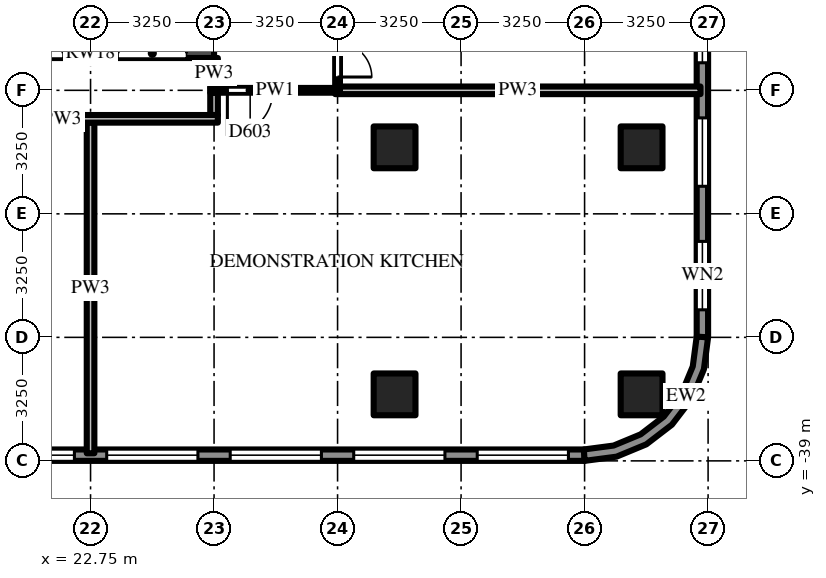
"""IFC4 building model, lengths in metres.
Left out: names, types, materials, properties, quantities, classifications, styles, units other than length and angle.
Written with IfcOpenShell. Run it as: python <this file> out.ifc"""

import sys

from ifc_helpers import new_model, si_unit, direction, frame, frame_2d, origin, origin_2d, place, context, subcontext, project, spatial, polyline, rectangle, outline, extrude, source, transform, mapped, element, fill, save


model = new_model("IFC4")
c1 = context("Model", 3, precision=1e-05, world=origin(), true_north=direction((0.0, 1.0)))
c2 = subcontext(c1, "Body", "Model", "MODEL_VIEW")
j1 = project(units=[si_unit("LENGTHUNIT", "METRE"), si_unit("PLANEANGLEUNIT", "RADIAN")], contexts=[c1])
p1 = place(None, origin())
s1 = spatial("IfcSite", under=j1, at=p1, CompositionType="ELEMENT")
p2 = place(p1, origin())
s2 = spatial("IfcBuilding", under=s1, at=p2, CompositionType="ELEMENT")
p3 = place(p2, frame((0.0, 0.0, 14.0)))
s3 = spatial("IfcBuildingStorey", under=s2, at=p3, CompositionType="ELEMENT", Elevation=14.0)
m1 = source(origin(), c2, "Body", "SweptSolid", [
    extrude(rectangle(XDim=1.1, YDim=1.1, at=origin_2d()), origin(), (0.0, 0.0, 1.0), 5.0),
])
for number, where, z_axis, x_axis in (
    (1, (30.75, -30.75, 0.0), (0.0, 0.0, 1.0), (1.0, 0.0, 0.0)),
    (2, (30.75, -37.25, 0.0), (0.0, 0.0, 1.0), (1.0, 0.0, 0.0)),
    (3, (37.25, -30.75, 0.0), (0.0, 0.0, 1.0), (1.0, 0.0, 0.0)),
    (4, (37.25, -37.25, 0.0), (0.0, 0.0, 1.0), (1.0, 0.0, 0.0)),
):
    element("IfcColumn", number, at=place(p3, frame(where, z_axis=z_axis, x_axis=x_axis)), inside=s3, PredefinedType="COLUMN", context=c2, shape_type="MappedRepresentation", body=[
        mapped(m1, transform((0.0, 0.0, 0.0))),
    ])
m2 = source(origin(), c2, "Body", "SweptSolid", [
    extrude(rectangle(XDim=6.5, YDim=0.25, at=frame_2d((3.25, 0.0))), origin(), (0.0, 0.0, 1.0), 4.7),
])
p4 = place(p3, frame((19.5, -28.275, 0.0), z_axis=(0.0, 0.0, 1.0), x_axis=(1.0, 0.0, 0.0)))
e5 = element("IfcWall", 5, at=p4, inside=s3, PredefinedType="SHEAR", context=c2, shape_type="MappedRepresentation", body=[
    mapped(m2, transform((0.0, 0.0, 0.0))),
])
m3 = source(origin(), c2, "Body", "SweptSolid", [
    extrude(rectangle(XDim=1.8, YDim=2.1, at=frame_2d((0.9, 1.05))), frame((0.0, 0.135, 0.0), z_axis=(0.0, -1.0, 0.0), x_axis=(1.0, 0.0, 0.0)), (0.0, 0.0, 1.0), 0.27),
])
p5 = place(p4, frame((0.725, 0.0, 0.0)))
e6 = element("IfcOpeningElement", 6, at=p5, cuts=e5, PredefinedType="OPENING", context=c2, shape_type="MappedRepresentation", body=[
    mapped(m3, transform((0.0, 0.0, 0.0))),
])
p6 = place(p4, frame((3.975, 0.0, 0.0)))
e7 = element("IfcOpeningElement", 7, at=p6, cuts=e5, PredefinedType="OPENING", context=c2, shape_type="MappedRepresentation", body=[
    mapped(m3, transform((0.0, 0.0, 0.0))),
])
m4 = source(origin(), c2, "Body", "SweptSolid", [
    extrude(rectangle(XDim=71.5, YDim=0.3, at=frame_2d((35.75, 0.0))), origin(), (0.0, 0.0, 1.0), 4.7),
])
p7 = place(p3, frame((38.85, -35.75, 0.0), z_axis=(0.0, 0.0, 1.0), x_axis=(0.0, 1.0, 0.0)))
e8 = element("IfcWall", 8, at=p7, inside=s3, PredefinedType="SOLIDWALL", context=c2, shape_type="MappedRepresentation", body=[
    mapped(m4, transform((0.0, 0.0, 0.0))),
])
m5 = source(origin(), c2, "Body", "SweptSolid", [
    extrude(rectangle(XDim=1.8, YDim=3.0, at=frame_2d((0.9, 1.5))), frame((0.0, 0.16, 0.0), z_axis=(0.0, -1.0, 0.0), x_axis=(1.0, 0.0, 0.0)), (0.0, 0.0, 1.0), 0.32),
])
p8 = place(p7, frame((0.725, 0.0, 0.9)))
e9 = element("IfcOpeningElement", 9, at=p8, cuts=e8, PredefinedType="OPENING", context=c2, shape_type="MappedRepresentation", body=[
    mapped(m5, transform((0.0, 0.0, 0.0))),
])
p9 = place(p7, frame((3.975, 0.0, 0.9)))
e10 = element("IfcOpeningElement", 10, at=p9, cuts=e8, PredefinedType="OPENING", context=c2, shape_type="MappedRepresentation", body=[
    mapped(m5, transform((0.0, 0.0, 0.0))),
])
p10 = place(p7, frame((7.225, 0.0, 0.9)))
e11 = element("IfcOpeningElement", 11, at=p10, cuts=e8, PredefinedType="OPENING", context=c2, shape_type="MappedRepresentation", body=[
    mapped(m5, transform((0.0, 0.0, 0.0))),
])
p11 = place(p7, frame((10.475, 0.0, 0.9)))
e12 = element("IfcOpeningElement", 12, at=p11, cuts=e8, PredefinedType="OPENING", context=c2, shape_type="MappedRepresentation", body=[
    mapped(m5, transform((0.0, 0.0, 0.0))),
])
p12 = place(p7, frame((13.725, 0.0, 0.9)))
e13 = element("IfcOpeningElement", 13, at=p12, cuts=e8, PredefinedType="OPENING", context=c2, shape_type="MappedRepresentation", body=[
    mapped(m5, transform((0.0, 0.0, 0.0))),
])
p13 = place(p7, frame((16.975, 0.0, 0.9)))
e14 = element("IfcOpeningElement", 14, at=p13, cuts=e8, PredefinedType="OPENING", context=c2, shape_type="MappedRepresentation", body=[
    mapped(m5, transform((0.0, 0.0, 0.0))),
])
p14 = place(p7, frame((20.225, 0.0, 0.9)))
e15 = element("IfcOpeningElement", 15, at=p14, cuts=e8, PredefinedType="OPENING", context=c2, shape_type="MappedRepresentation", body=[
    mapped(m5, transform((0.0, 0.0, 0.0))),
])
p15 = place(p7, frame((23.475, 0.0, 0.9)))
e16 = element("IfcOpeningElement", 16, at=p15, cuts=e8, PredefinedType="OPENING", context=c2, shape_type="MappedRepresentation", body=[
    mapped(m5, transform((0.0, 0.0, 0.0))),
])
p16 = place(p7, frame((26.725, 0.0, 0.9)))
e17 = element("IfcOpeningElement", 17, at=p16, cuts=e8, PredefinedType="OPENING", context=c2, shape_type="MappedRepresentation", body=[
    mapped(m5, transform((0.0, 0.0, 0.0))),
])
p17 = place(p7, frame((29.975, 0.0, 0.9)))
e18 = element("IfcOpeningElement", 18, at=p17, cuts=e8, PredefinedType="OPENING", context=c2, shape_type="MappedRepresentation", body=[
    mapped(m5, transform((0.0, 0.0, 0.0))),
])
p18 = place(p7, frame((33.225, 0.0, 0.9)))
e19 = element("IfcOpeningElement", 19, at=p18, cuts=e8, PredefinedType="OPENING", context=c2, shape_type="MappedRepresentation", body=[
    mapped(m5, transform((0.0, 0.0, 0.0))),
])
p19 = place(p7, frame((36.475, 0.0, 0.9)))
e20 = element("IfcOpeningElement", 20, at=p19, cuts=e8, PredefinedType="OPENING", context=c2, shape_type="MappedRepresentation", body=[
    mapped(m5, transform((0.0, 0.0, 0.0))),
])
p20 = place(p7, frame((39.725, 0.0, 0.9)))
e21 = element("IfcOpeningElement", 21, at=p20, cuts=e8, PredefinedType="OPENING", context=c2, shape_type="MappedRepresentation", body=[
    mapped(m5, transform((0.0, 0.0, 0.0))),
])
p21 = place(p7, frame((42.975, 0.0, 0.9)))
e22 = element("IfcOpeningElement", 22, at=p21, cuts=e8, PredefinedType="OPENING", context=c2, shape_type="MappedRepresentation", body=[
    mapped(m5, transform((0.0, 0.0, 0.0))),
])
p22 = place(p7, frame((46.225, 0.0, 0.9)))
e23 = element("IfcOpeningElement", 23, at=p22, cuts=e8, PredefinedType="OPENING", context=c2, shape_type="MappedRepresentation", body=[
    mapped(m5, transform((0.0, 0.0, 0.0))),
])
p23 = place(p7, frame((49.475, 0.0, 0.9)))
e24 = element("IfcOpeningElement", 24, at=p23, cuts=e8, PredefinedType="OPENING", context=c2, shape_type="MappedRepresentation", body=[
    mapped(m5, transform((0.0, 0.0, 0.0))),
])
p24 = place(p7, frame((52.725, 0.0, 0.9)))
e25 = element("IfcOpeningElement", 25, at=p24, cuts=e8, PredefinedType="OPENING", context=c2, shape_type="MappedRepresentation", body=[
    mapped(m5, transform((0.0, 0.0, 0.0))),
])
p25 = place(p7, frame((55.975, 0.0, 0.9)))
e26 = element("IfcOpeningElement", 26, at=p25, cuts=e8, PredefinedType="OPENING", context=c2, shape_type="MappedRepresentation", body=[
    mapped(m5, transform((0.0, 0.0, 0.0))),
])
p26 = place(p7, frame((59.225, 0.0, 0.9)))
e27 = element("IfcOpeningElement", 27, at=p26, cuts=e8, PredefinedType="OPENING", context=c2, shape_type="MappedRepresentation", body=[
    mapped(m5, transform((0.0, 0.0, 0.0))),
])
p27 = place(p7, frame((62.475, 0.0, 0.9)))
e28 = element("IfcOpeningElement", 28, at=p27, cuts=e8, PredefinedType="OPENING", context=c2, shape_type="MappedRepresentation", body=[
    mapped(m5, transform((0.0, 0.0, 0.0))),
])
p28 = place(p7, frame((65.725, 0.0, 0.9)))
e29 = element("IfcOpeningElement", 29, at=p28, cuts=e8, PredefinedType="OPENING", context=c2, shape_type="MappedRepresentation", body=[
    mapped(m5, transform((0.0, 0.0, 0.0))),
])
p29 = place(p7, frame((68.975, 0.0, 0.9)))
e30 = element("IfcOpeningElement", 30, at=p29, cuts=e8, PredefinedType="OPENING", context=c2, shape_type="MappedRepresentation", body=[
    mapped(m5, transform((0.0, 0.0, 0.0))),
])
p30 = place(p3, frame((-35.75, -38.85, 0.0), z_axis=(0.0, 0.0, 1.0), x_axis=(1.0, 0.0, 0.0)))
e31 = element("IfcWall", 31, at=p30, inside=s3, PredefinedType="SOLIDWALL", context=c2, shape_type="MappedRepresentation", body=[
    mapped(m4, transform((0.0, 0.0, 0.0))),
])
m6 = source(origin(), c2, "Body", "SweptSolid", [
    extrude(rectangle(XDim=2.4, YDim=3.0, at=frame_2d((1.2, 1.5))), frame((0.0, 0.16, 0.0), z_axis=(0.0, -1.0, 0.0), x_axis=(1.0, 0.0, 0.0)), (0.0, 0.0, 1.0), 0.32),
])
p31 = place(p30, frame((0.425, 0.0, 0.9)))
e32 = element("IfcOpeningElement", 32, at=p31, cuts=e31, PredefinedType="OPENING", context=c2, shape_type="MappedRepresentation", body=[
    mapped(m6, transform((0.0, 0.0, 0.0))),
])
p32 = place(p30, frame((3.675, 0.0, 0.9)))
e33 = element("IfcOpeningElement", 33, at=p32, cuts=e31, PredefinedType="OPENING", context=c2, shape_type="MappedRepresentation", body=[
    mapped(m6, transform((0.0, 0.0, 0.0))),
])
p33 = place(p30, frame((6.925, 0.0, 0.9)))
e34 = element("IfcOpeningElement", 34, at=p33, cuts=e31, PredefinedType="OPENING", context=c2, shape_type="MappedRepresentation", body=[
    mapped(m6, transform((0.0, 0.0, 0.0))),
])
p34 = place(p30, frame((10.175, 0.0, 0.9)))
e35 = element("IfcOpeningElement", 35, at=p34, cuts=e31, PredefinedType="OPENING", context=c2, shape_type="MappedRepresentation", body=[
    mapped(m6, transform((0.0, 0.0, 0.0))),
])
p35 = place(p30, frame((13.425, 0.0, 0.9)))
e36 = element("IfcOpeningElement", 36, at=p35, cuts=e31, PredefinedType="OPENING", context=c2, shape_type="MappedRepresentation", body=[
    mapped(m6, transform((0.0, 0.0, 0.0))),
])
p36 = place(p30, frame((16.675, 0.0, 0.9)))
e37 = element("IfcOpeningElement", 37, at=p36, cuts=e31, PredefinedType="OPENING", context=c2, shape_type="MappedRepresentation", body=[
    mapped(m6, transform((0.0, 0.0, 0.0))),
])
p37 = place(p30, frame((19.925, 0.0, 0.9)))
e38 = element("IfcOpeningElement", 38, at=p37, cuts=e31, PredefinedType="OPENING", context=c2, shape_type="MappedRepresentation", body=[
    mapped(m6, transform((0.0, 0.0, 0.0))),
])
p38 = place(p30, frame((23.175, 0.0, 0.9)))
e39 = element("IfcOpeningElement", 39, at=p38, cuts=e31, PredefinedType="OPENING", context=c2, shape_type="MappedRepresentation", body=[
    mapped(m6, transform((0.0, 0.0, 0.0))),
])
p39 = place(p30, frame((26.425, 0.0, 0.9)))
e40 = element("IfcOpeningElement", 40, at=p39, cuts=e31, PredefinedType="OPENING", context=c2, shape_type="MappedRepresentation", body=[
    mapped(m6, transform((0.0, 0.0, 0.0))),
])
p40 = place(p30, frame((29.675, 0.0, 0.9)))
e41 = element("IfcOpeningElement", 41, at=p40, cuts=e31, PredefinedType="OPENING", context=c2, shape_type="MappedRepresentation", body=[
    mapped(m6, transform((0.0, 0.0, 0.0))),
])
p41 = place(p30, frame((32.925, 0.0, 0.9)))
e42 = element("IfcOpeningElement", 42, at=p41, cuts=e31, PredefinedType="OPENING", context=c2, shape_type="MappedRepresentation", body=[
    mapped(m6, transform((0.0, 0.0, 0.0))),
])
p42 = place(p30, frame((36.175, 0.0, 0.9)))
e43 = element("IfcOpeningElement", 43, at=p42, cuts=e31, PredefinedType="OPENING", context=c2, shape_type="MappedRepresentation", body=[
    mapped(m6, transform((0.0, 0.0, 0.0))),
])
p43 = place(p30, frame((39.425, 0.0, 0.9)))
e44 = element("IfcOpeningElement", 44, at=p43, cuts=e31, PredefinedType="OPENING", context=c2, shape_type="MappedRepresentation", body=[
    mapped(m6, transform((0.0, 0.0, 0.0))),
])
p44 = place(p30, frame((42.675, 0.0, 0.9)))
e45 = element("IfcOpeningElement", 45, at=p44, cuts=e31, PredefinedType="OPENING", context=c2, shape_type="MappedRepresentation", body=[
    mapped(m6, transform((0.0, 0.0, 0.0))),
])
p45 = place(p30, frame((45.925, 0.0, 0.9)))
e46 = element("IfcOpeningElement", 46, at=p45, cuts=e31, PredefinedType="OPENING", context=c2, shape_type="MappedRepresentation", body=[
    mapped(m6, transform((0.0, 0.0, 0.0))),
])
p46 = place(p30, frame((49.175, 0.0, 0.9)))
e47 = element("IfcOpeningElement", 47, at=p46, cuts=e31, PredefinedType="OPENING", context=c2, shape_type="MappedRepresentation", body=[
    mapped(m6, transform((0.0, 0.0, 0.0))),
])
p47 = place(p30, frame((52.425, 0.0, 0.9)))
e48 = element("IfcOpeningElement", 48, at=p47, cuts=e31, PredefinedType="OPENING", context=c2, shape_type="MappedRepresentation", body=[
    mapped(m6, transform((0.0, 0.0, 0.0))),
])
p48 = place(p30, frame((55.675, 0.0, 0.9)))
e49 = element("IfcOpeningElement", 49, at=p48, cuts=e31, PredefinedType="OPENING", context=c2, shape_type="MappedRepresentation", body=[
    mapped(m6, transform((0.0, 0.0, 0.0))),
])
p49 = place(p30, frame((58.925, 0.0, 0.9)))
e50 = element("IfcOpeningElement", 50, at=p49, cuts=e31, PredefinedType="OPENING", context=c2, shape_type="MappedRepresentation", body=[
    mapped(m6, transform((0.0, 0.0, 0.0))),
])
p50 = place(p30, frame((62.175, 0.0, 0.9)))
e51 = element("IfcOpeningElement", 51, at=p50, cuts=e31, PredefinedType="OPENING", context=c2, shape_type="MappedRepresentation", body=[
    mapped(m6, transform((0.0, 0.0, 0.0))),
])
p51 = place(p30, frame((65.425, 0.0, 0.9)))
e52 = element("IfcOpeningElement", 52, at=p51, cuts=e31, PredefinedType="OPENING", context=c2, shape_type="MappedRepresentation", body=[
    mapped(m6, transform((0.0, 0.0, 0.0))),
])
p52 = place(p30, frame((68.675, 0.0, 0.9)))
e53 = element("IfcOpeningElement", 53, at=p52, cuts=e31, PredefinedType="OPENING", context=c2, shape_type="MappedRepresentation", body=[
    mapped(m6, transform((0.0, 0.0, 0.0))),
])
m7 = source(origin(), c2, "Body", "SweptSolid", [
    extrude(outline(polyline([(35.75, -39.0), (36.591, -38.889), (37.375, -38.565), (38.048, -38.048), (38.565, -37.375), (38.889, -36.591), (39.0, -35.75), (38.7, -35.73), (38.597, -36.513), (38.302, -37.224), (37.834, -37.834), (37.224, -38.302), (36.513, -38.597), (35.73, -38.7), (35.75, -39.0)])), origin(), (0.0, 0.0, 1.0), 4.7),
])
p53 = place(p3, origin())
e54 = element("IfcWall", 54, at=p53, inside=s3, PredefinedType="SOLIDWALL", context=c2, shape_type="MappedRepresentation", body=[
    mapped(m7, transform((0.0, 0.0, 0.0))),
])
m8 = source(origin(), c2, "Body", "SweptSolid", [
    extrude(rectangle(XDim=8.7, YDim=0.2, at=frame_2d((4.35, 0.0))), origin(), (0.0, 0.0, 1.0), 3.762),
])
p54 = place(p3, frame((22.75, -38.8, 0.0), z_axis=(0.0, 0.0, 1.0), x_axis=(0.0, 1.0, 0.0)))
e55 = element("IfcWall", 55, at=p54, inside=s3, PredefinedType="PARTITIONING", context=c2, shape_type="MappedRepresentation", body=[
    mapped(m8, transform((0.0, 0.0, 0.0))),
])
m9 = source(origin(), c2, "Body", "SweptSolid", [
    extrude(rectangle(XDim=0.788, YDim=0.2, at=frame_2d((0.394, 0.0))), origin(), (0.0, 0.0, 1.0), 4.7),
])
p55 = place(p3, frame((26.0, -29.188, 0.0), z_axis=(0.0, 0.0, 1.0), x_axis=(0.0, 1.0, 0.0)))
e56 = element("IfcWall", 56, at=p55, inside=s3, PredefinedType="PARTITIONING", context=c2, shape_type="MappedRepresentation", body=[
    mapped(m9, transform((0.0, 0.0, 0.0))),
])
m10 = source(origin(), c2, "Body", "SweptSolid", [
    extrude(rectangle(XDim=0.587, YDim=0.2, at=frame_2d((0.294, 0.0))), origin(), (0.0, 0.0, 1.0), 4.7),
])
p56 = place(p3, frame((26.0, -29.312, 0.0), z_axis=(0.0, 0.0, 1.0), x_axis=(0.0, -1.0, 0.0)))
e57 = element("IfcWall", 57, at=p56, inside=s3, PredefinedType="PARTITIONING", context=c2, shape_type="MappedRepresentation", body=[
    mapped(m10, transform((0.0, 0.0, 0.0))),
])
p57 = place(p3, frame((29.25, -13.05, 0.0), z_axis=(0.0, 0.0, 1.0), x_axis=(0.0, -1.0, 0.0)))
e58 = element("IfcWall", 58, at=p57, inside=s3, PredefinedType="PARTITIONING", context=c2, shape_type="SweptSolid", body=[
    extrude(rectangle(XDim=16.1, YDim=0.125, at=frame_2d((8.05, 0.0))), origin(), (0.0, 0.0, 1.0), 3.762),
])
m11 = source(origin(), c2, "Body", "SweptSolid", [
    extrude(rectangle(XDim=1.8, YDim=2.1, at=frame_2d((0.9, 1.05))), frame((0.0, 0.073, 0.0), z_axis=(0.0, -1.0, 0.0), x_axis=(1.0, 0.0, 0.0)), (0.0, 0.0, 1.0), 0.145),
])
p58 = place(p57, frame((14.05, 0.0, 0.0)))
e59 = element("IfcOpeningElement", 59, at=p58, cuts=e58, PredefinedType="OPENING", context=c2, shape_type="MappedRepresentation", body=[
    mapped(m11, transform((0.0, 0.0, 0.0))),
])
m12 = source(origin(), c2, "Body", "SweptSolid", [
    extrude(rectangle(XDim=8.2, YDim=0.2, at=frame_2d((4.1, 0.0))), origin(), (0.0, 0.0, 1.0), 3.762),
])
p59 = place(p3, frame((26.1, -30.0, 0.0), z_axis=(0.0, 0.0, 1.0), x_axis=(-1.0, 0.0, 0.0)))
e60 = element("IfcWall", 60, at=p59, inside=s3, PredefinedType="PARTITIONING", context=c2, shape_type="MappedRepresentation", body=[
    mapped(m12, transform((0.0, 0.0, 0.0))),
])
m13 = source(origin(), c2, "Body", "SweptSolid", [
    extrude(rectangle(XDim=9.613, YDim=0.2, at=frame_2d((4.806, 0.0))), origin(), (0.0, 0.0, 1.0), 3.762),
])
p60 = place(p3, frame((29.188, -29.25, 0.0), z_axis=(0.0, 0.0, 1.0), x_axis=(1.0, 0.0, 0.0)))
e61 = element("IfcWall", 61, at=p60, inside=s3, PredefinedType="PARTITIONING", context=c2, shape_type="MappedRepresentation", body=[
    mapped(m13, transform((0.0, 0.0, 0.0))),
])
m14 = source(origin(), c2, "Body", "SweptSolid", [
    extrude(rectangle(XDim=3.413, YDim=0.125, at=frame_2d((1.706, 0.0))), origin(), (0.0, 0.0, 1.0), 4.7),
])
p61 = place(p3, frame((29.312, -29.25, 0.0), z_axis=(0.0, 0.0, 1.0), x_axis=(-1.0, 0.0, 0.0)))
e62 = element("IfcWall", 62, at=p61, inside=s3, PredefinedType="PARTITIONING", context=c2, shape_type="MappedRepresentation", body=[
    mapped(m14, transform((0.0, 0.0, 0.0))),
])
m15 = source(origin(), c2, "Body", "SweptSolid", [
    extrude(rectangle(XDim=1.2, YDim=2.1, at=frame_2d((0.6, 1.05))), frame((0.0, 0.073, 0.0), z_axis=(0.0, -1.0, 0.0), x_axis=(1.0, 0.0, 0.0)), (0.0, 0.0, 1.0), 0.145),
])
p62 = place(p61, frame((1.762, 0.0, 0.0)))
e63 = element("IfcOpeningElement", 63, at=p62, cuts=e62, PredefinedType="OPENING", context=c2, shape_type="MappedRepresentation", body=[
    mapped(m15, transform((0.0, 0.0, 0.0))),
])
m16 = source(origin(), c2, "Body", "SweptSolid", [
    extrude(rectangle(XDim=1.8, YDim=2.1, at=frame_2d((0.9, 1.05))), frame((0.0, 0.025, 0.0), z_axis=(0.0, -1.0, 0.0), x_axis=(1.0, 0.0, 0.0)), (0.0, 0.0, 1.0), 0.05),
])
p63 = place(p5, origin())
e64 = element("IfcDoor", 64, at=p63, inside=s3, OperationType="DOUBLE_DOOR_SINGLE_SWING", PredefinedType="DOOR", context=c2, shape_type="MappedRepresentation", body=[
    mapped(m16, transform((0.0, 0.0, 0.0))),
])
fill(e6, e64)
p64 = place(p6, origin())
e65 = element("IfcDoor", 65, at=p64, inside=s3, OperationType="DOUBLE_DOOR_SINGLE_SWING", PredefinedType="DOOR", context=c2, shape_type="MappedRepresentation", body=[
    mapped(m16, transform((0.0, 0.0, 0.0))),
])
fill(e7, e65)
m17 = source(origin(), c2, "Body", "SweptSolid", [
    extrude(rectangle(XDim=1.8, YDim=3.0, at=frame_2d((0.9, 1.5))), frame((0.0, 0.03, 0.0), z_axis=(0.0, -1.0, 0.0), x_axis=(1.0, 0.0, 0.0)), (0.0, 0.0, 1.0), 0.06),
])
p65 = place(p8, origin())
e66 = element("IfcWindow", 66, at=p65, inside=s3, PartitioningType="SINGLE_PANEL", PredefinedType="WINDOW", context=c2, shape_type="MappedRepresentation", body=[
    mapped(m17, transform((0.0, 0.0, 0.0))),
])
fill(e9, e66)
p66 = place(p9, origin())
e67 = element("IfcWindow", 67, at=p66, inside=s3, PartitioningType="SINGLE_PANEL", PredefinedType="WINDOW", context=c2, shape_type="MappedRepresentation", body=[
    mapped(m17, transform((0.0, 0.0, 0.0))),
])
fill(e10, e67)
p67 = place(p10, origin())
e68 = element("IfcWindow", 68, at=p67, inside=s3, PartitioningType="SINGLE_PANEL", PredefinedType="WINDOW", context=c2, shape_type="MappedRepresentation", body=[
    mapped(m17, transform((0.0, 0.0, 0.0))),
])
fill(e11, e68)
m18 = source(origin(), c2, "Body", "SweptSolid", [
    extrude(rectangle(XDim=2.4, YDim=3.0, at=frame_2d((1.2, 1.5))), frame((0.0, 0.03, 0.0), z_axis=(0.0, -1.0, 0.0), x_axis=(1.0, 0.0, 0.0)), (0.0, 0.0, 1.0), 0.06),
])
p68 = place(p48, origin())
e69 = element("IfcWindow", 69, at=p68, inside=s3, PartitioningType="SINGLE_PANEL", PredefinedType="WINDOW", context=c2, shape_type="MappedRepresentation", body=[
    mapped(m18, transform((0.0, 0.0, 0.0))),
])
fill(e49, e69)
p69 = place(p49, origin())
e70 = element("IfcWindow", 70, at=p69, inside=s3, PartitioningType="SINGLE_PANEL", PredefinedType="WINDOW", context=c2, shape_type="MappedRepresentation", body=[
    mapped(m18, transform((0.0, 0.0, 0.0))),
])
fill(e50, e70)
p70 = place(p50, origin())
e71 = element("IfcWindow", 71, at=p70, inside=s3, PartitioningType="SINGLE_PANEL", PredefinedType="WINDOW", context=c2, shape_type="MappedRepresentation", body=[
    mapped(m18, transform((0.0, 0.0, 0.0))),
])
fill(e51, e71)
p71 = place(p51, origin())
e72 = element("IfcWindow", 72, at=p71, inside=s3, PartitioningType="SINGLE_PANEL", PredefinedType="WINDOW", context=c2, shape_type="MappedRepresentation", body=[
    mapped(m18, transform((0.0, 0.0, 0.0))),
])
fill(e52, e72)
p72 = place(p52, origin())
e73 = element("IfcWindow", 73, at=p72, inside=s3, PartitioningType="SINGLE_PANEL", PredefinedType="WINDOW", context=c2, shape_type="MappedRepresentation", body=[
    mapped(m18, transform((0.0, 0.0, 0.0))),
])
fill(e53, e73)
m19 = source(origin(), c2, "Body", "SweptSolid", [
    extrude(rectangle(XDim=1.2, YDim=2.1, at=frame_2d((0.6, 1.05))), frame((0.0, 0.025, 0.0), z_axis=(0.0, -1.0, 0.0), x_axis=(1.0, 0.0, 0.0)), (0.0, 0.0, 1.0), 0.05),
])
p73 = place(p62, origin())
e74 = element("IfcDoor", 74, at=p73, inside=s3, OperationType="SINGLE_SWING_RIGHT", PredefinedType="DOOR", context=c2, shape_type="MappedRepresentation", body=[
    mapped(m19, transform((0.0, 0.0, 0.0))),
])
fill(e63, e74)
p74 = place(p58, origin())
e75 = element("IfcDoor", 75, at=p74, inside=s3, OperationType="DOUBLE_DOOR_SINGLE_SWING", PredefinedType="DOOR", context=c2, shape_type="MappedRepresentation", body=[
    mapped(m16, transform((0.0, 0.0, 0.0))),
])
fill(e59, e75)
save(model, sys.argv[1])
